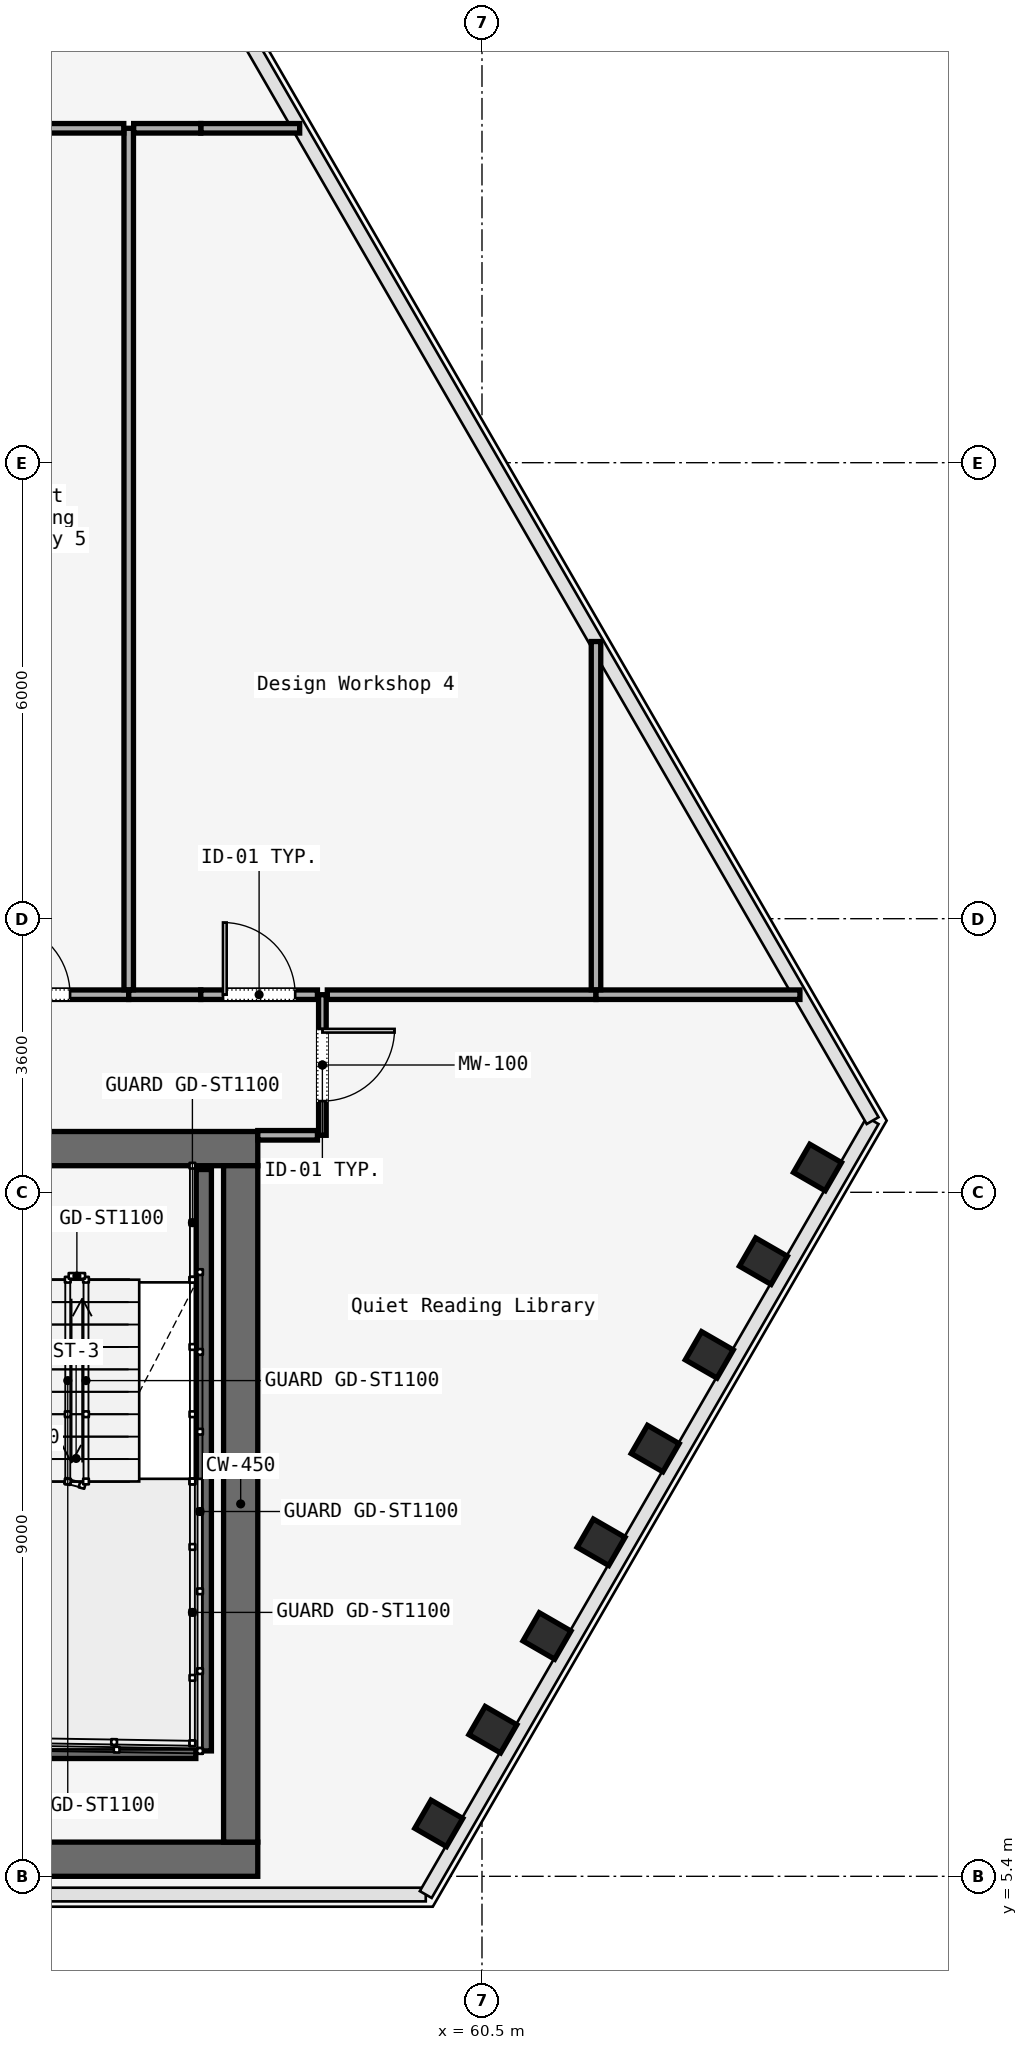
"""IFC4 building model, lengths in metres.
Left out: names, types, materials, properties, quantities, classifications, styles, units other than length and angle.
Written with IfcOpenShell. Run it as: python <this file> out.ifc"""

import sys

from ifc_helpers import new_model, si_unit, direction, frame, frame_2d, origin, origin_2d, place, context, subcontext, project, spatial, rectangle, i_section, extrude, element, fill, save


model = new_model("IFC4")
c1 = context("Model", 3, precision=1e-05, world=origin(), true_north=direction((0.0, 1.0)))
c2 = subcontext(c1, "Body", "Model", "MODEL_VIEW")
j1 = project(units=[si_unit("LENGTHUNIT", "METRE"), si_unit("PLANEANGLEUNIT", "RADIAN")], contexts=[c1])
p1 = place(None, origin())
s1 = spatial("IfcSite", under=j1, at=p1, CompositionType="ELEMENT")
p2 = place(p1, origin())
s2 = spatial("IfcBuilding", under=s1, at=p2, CompositionType="ELEMENT")
p3 = place(p2, frame((0.0, 0.0, 146.0)))
s3 = spatial("IfcBuildingStorey", under=s2, at=p3, CompositionType="ELEMENT", Elevation=146.0)
p4 = place(p3, frame((26.45, 14.975, 0.0), z_axis=(0.0, 0.0, 1.0), x_axis=(1.0, 0.0, 0.0)))
e1 = element("IfcWall", 1, at=p4, inside=s3, PredefinedType="SOLIDWALL", context=c2, shape_type="SweptSolid", body=[
    extrude(rectangle(XDim=31.1, YDim=0.45, at=frame_2d((15.55, 0.0))), origin(), (0.0, 0.0, 1.0), 3.58),
])
p5 = place(p4, frame((1.65, 0.0, 0.0)))
e2 = element("IfcOpeningElement", 2, at=p5, cuts=e1, PredefinedType="OPENING", context=c2, shape_type="SweptSolid", body=[
    extrude(rectangle(XDim=1.1, YDim=2.2, at=frame_2d((0.55, 1.1))), frame((0.0, 0.225, 0.0), z_axis=(0.0, -1.0, 0.0), x_axis=(1.0, 0.0, 0.0)), (0.0, 0.0, 1.0), 0.45),
])
p6 = place(p4, frame((13.65, 0.0, 0.0)))
e3 = element("IfcOpeningElement", 3, at=p6, cuts=e1, PredefinedType="OPENING", context=c2, shape_type="SweptSolid", body=[
    extrude(rectangle(XDim=1.1, YDim=2.2, at=frame_2d((0.55, 1.1))), frame((0.0, 0.225, 0.0), z_axis=(0.0, -1.0, 0.0), x_axis=(1.0, 0.0, 0.0)), (0.0, 0.0, 1.0), 0.45),
])
p7 = place(p4, frame((25.55, 0.0, 0.0)))
e4 = element("IfcOpeningElement", 4, at=p7, cuts=e1, PredefinedType="OPENING", context=c2, shape_type="SweptSolid", body=[
    extrude(rectangle(XDim=1.1, YDim=2.2, at=frame_2d((0.55, 1.1))), frame((0.0, 0.225, 0.0), z_axis=(0.0, -1.0, 0.0), x_axis=(1.0, 0.0, 0.0)), (0.0, 0.0, 1.0), 0.45),
])
p8 = place(p4, frame((10.7, 0.0, 0.0)))
e5 = element("IfcOpeningElement", 5, at=p8, cuts=e1, PredefinedType="OPENING", context=c2, shape_type="SweptSolid", body=[
    extrude(rectangle(XDim=1.4, YDim=2.2, at=frame_2d((0.7, 1.1))), frame((0.0, 0.225, 0.0), z_axis=(0.0, -1.0, 0.0), x_axis=(1.0, 0.0, 0.0)), (0.0, 0.0, 1.0), 0.45),
])
p9 = place(p4, frame((19.35, 0.0, 0.0)))
e6 = element("IfcOpeningElement", 6, at=p9, cuts=e1, PredefinedType="OPENING", context=c2, shape_type="SweptSolid", body=[
    extrude(rectangle(XDim=1.1, YDim=2.2, at=frame_2d((0.55, 1.1))), frame((0.0, 0.225, 0.0), z_axis=(0.0, -1.0, 0.0), x_axis=(1.0, 0.0, 0.0)), (0.0, 0.0, 1.0), 0.45),
])
p10 = place(p4, frame((21.4, 0.0, 0.0)))
e7 = element("IfcOpeningElement", 7, at=p10, cuts=e1, PredefinedType="OPENING", context=c2, shape_type="SweptSolid", body=[
    extrude(rectangle(XDim=0.9, YDim=2.1, at=frame_2d((0.45, 1.05))), frame((0.0, 0.225, 0.0), z_axis=(0.0, -1.0, 0.0), x_axis=(1.0, 0.0, 0.0)), (0.0, 0.0, 1.0), 0.45),
])
p11 = place(p4, frame((23.35, 0.0, 0.0)))
e8 = element("IfcOpeningElement", 8, at=p11, cuts=e1, PredefinedType="OPENING", context=c2, shape_type="SweptSolid", body=[
    extrude(rectangle(XDim=1.3, YDim=2.3, at=frame_2d((0.65, 1.15))), frame((0.0, 0.225, 0.0), z_axis=(0.0, -1.0, 0.0), x_axis=(1.0, 0.0, 0.0)), (0.0, 0.0, 1.0), 0.45),
])
p12 = place(p3, frame((26.45, 5.625, 0.0), z_axis=(0.0, 0.0, 1.0), x_axis=(1.0, 0.0, 0.0)))
e9 = element("IfcWall", 9, at=p12, inside=s3, PredefinedType="SOLIDWALL", context=c2, shape_type="SweptSolid", body=[
    extrude(rectangle(XDim=31.1, YDim=0.45, at=frame_2d((15.55, 0.0))), origin(), (0.0, 0.0, 1.0), 3.58),
])
p13 = place(p3, frame((57.325, 5.85, 0.0), z_axis=(0.0, 0.0, 1.0), x_axis=(0.0, 1.0, 0.0)))
e10 = element("IfcWall", 10, at=p13, inside=s3, PredefinedType="SOLIDWALL", context=c2, shape_type="SweptSolid", body=[
    extrude(rectangle(XDim=8.9, YDim=0.45, at=frame_2d((4.45, 0.0))), origin(), (0.0, 0.0, 1.0), 3.58),
])
p14 = place(p3, frame((59.931, 6.096, 0.0), z_axis=(0.082839870593, -0.008698526198, 0.996524907607), x_axis=(-0.806082141971, 0.587390840077, 0.072135853696)))
e11 = element("IfcColumn", 11, at=p14, inside=s3, PredefinedType="COLUMN", context=c2, shape_type="SweptSolid", body=[
    extrude(i_section(OverallWidth=0.428, OverallDepth=0.481, WebThickness=0.051, FlangeThickness=0.065, FilletRadius=0.015, at=origin_2d()), origin(), (0.0, 0.0, 1.0), 3.593),
])
p15 = place(p3, frame((60.643, 7.329, 0.0), z_axis=(0.0728174138, -0.025972224156, 0.99700705505), x_axis=(-0.645278448481, 0.76100790061, 0.066952962108)))
e12 = element("IfcColumn", 12, at=p15, inside=s3, PredefinedType="COLUMN", context=c2, shape_type="SweptSolid", body=[
    extrude(i_section(OverallWidth=0.428, OverallDepth=0.481, WebThickness=0.051, FlangeThickness=0.065, FilletRadius=0.015, at=origin_2d()), origin(), (0.0, 0.0, 1.0), 3.591),
])
p16 = place(p3, frame((61.355, 8.562, 0.0), z_axis=(0.06289544663, -0.043312864328, 0.99707981555), x_axis=(-0.427590176729, 0.901550198102, 0.0661353239)))
e13 = element("IfcColumn", 13, at=p16, inside=s3, PredefinedType="COLUMN", context=c2, shape_type="SweptSolid", body=[
    extrude(i_section(OverallWidth=0.428, OverallDepth=0.481, WebThickness=0.051, FlangeThickness=0.065, FilletRadius=0.015, at=origin_2d()), origin(), (0.0, 0.0, 1.0), 3.591),
])
p17 = place(p3, frame((62.067, 9.795, 0.0), z_axis=(0.05281532937, -0.06063227001, 0.996761891736), x_axis=(-0.189966625572, 0.979317815003, 0.069636903918)))
e14 = element("IfcColumn", 14, at=p17, inside=s3, PredefinedType="COLUMN", context=c2, shape_type="SweptSolid", body=[
    extrude(i_section(OverallWidth=0.428, OverallDepth=0.481, WebThickness=0.051, FlangeThickness=0.065, FilletRadius=0.015, at=origin_2d()), origin(), (0.0, 0.0, 1.0), 3.592),
])
p18 = place(p3, frame((62.779, 11.028, 0.0), z_axis=(0.042792297072, -0.077909150383, 0.996041657561), x_axis=(0.022973401155, 0.996768007381, 0.076978973114)))
e15 = element("IfcColumn", 15, at=p18, inside=s3, PredefinedType="COLUMN", context=c2, shape_type="SweptSolid", body=[
    extrude(i_section(OverallWidth=0.428, OverallDepth=0.481, WebThickness=0.051, FlangeThickness=0.065, FilletRadius=0.015, at=origin_2d()), origin(), (0.0, 0.0, 1.0), 3.594),
])
p19 = place(p3, frame((63.49, 12.261, 0.0), z_axis=(0.032770679105, -0.095123172061, 0.99492595942), x_axis=(0.192082129751, 0.977503301261, 0.087130657372)))
e16 = element("IfcColumn", 16, at=p19, inside=s3, PredefinedType="COLUMN", context=c2, shape_type="SweptSolid", body=[
    extrude(i_section(OverallWidth=0.428, OverallDepth=0.481, WebThickness=0.051, FlangeThickness=0.065, FilletRadius=0.015, at=origin_2d()), origin(), (0.0, 0.0, 1.0), 3.598),
])
p20 = place(p3, frame((64.202, 13.494, 0.0), z_axis=(0.022762459803, -0.112254154445, 0.993418781398), x_axis=(0.319053107814, 0.942531575503, 0.099193465383)))
e17 = element("IfcColumn", 17, at=p20, inside=s3, PredefinedType="COLUMN", context=c2, shape_type="SweptSolid", body=[
    extrude(i_section(OverallWidth=0.428, OverallDepth=0.481, WebThickness=0.051, FlangeThickness=0.065, FilletRadius=0.015, at=origin_2d()), origin(), (0.0, 0.0, 1.0), 3.604),
])
p21 = place(p3, frame((64.914, 14.727, 0.0), z_axis=(0.012779481275, -0.129282371416, 0.991525467802), x_axis=(0.413106039492, 0.903706514921, 0.112507488752)))
e18 = element("IfcColumn", 18, at=p21, inside=s3, PredefinedType="COLUMN", context=c2, shape_type="SweptSolid", body=[
    extrude(i_section(OverallWidth=0.428, OverallDepth=0.481, WebThickness=0.051, FlangeThickness=0.065, FilletRadius=0.015, at=origin_2d()), origin(), (0.0, 0.0, 1.0), 3.611),
])
p22 = place(p3, frame((56.84, 14.7, 0.0), z_axis=(0.0, 0.0, 1.0), x_axis=(0.0, -1.0, 0.0)))
e19 = element("IfcWall", 19, at=p22, inside=s3, PredefinedType="SOLIDWALL", context=c2, shape_type="SweptSolid", body=[
    extrude(rectangle(XDim=7.65, YDim=0.2, at=frame_2d((3.825, 0.0))), origin(), (0.0, 0.0, 1.0), 3.8),
])
p23 = place(p3, frame((53.62, 7.05, 0.0), z_axis=(0.0, 0.0, 1.0), x_axis=(1.0, 0.0, 0.0)))
e20 = element("IfcWall", 20, at=p23, inside=s3, PredefinedType="SOLIDWALL", context=c2, shape_type="SweptSolid", body=[
    extrude(rectangle(XDim=3.115, YDim=0.2, at=frame_2d((1.558, 0.0))), origin(), (0.0, 0.0, 1.0), 3.8),
])
p24 = place(p3, frame((58.4, 17.0, 0.0), z_axis=(0.0, 0.0, 1.0), x_axis=(0.0, -1.0, 0.0)))
e21 = element("IfcWall", 21, at=p24, inside=s3, PredefinedType="MOVABLE", context=c2, shape_type="SweptSolid", body=[
    extrude(rectangle(XDim=1.85, YDim=0.1, at=frame_2d((0.925, 0.0))), origin(), (0.0, 0.0, 1.0), 3.01),
])
p25 = place(p24, frame((0.45, 0.0, 0.0)))
e22 = element("IfcOpeningElement", 22, at=p25, cuts=e21, PredefinedType="OPENING", context=c2, shape_type="SweptSolid", body=[
    extrude(rectangle(XDim=0.95, YDim=2.2, at=frame_2d((0.475, 1.1))), frame((0.0, 0.05, 0.0), z_axis=(0.0, -1.0, 0.0), x_axis=(1.0, 0.0, 0.0)), (0.0, 0.0, 1.0), 0.1),
])
p26 = place(p3, frame((58.335, 15.15, 0.0), z_axis=(0.0, 0.0, 1.0), x_axis=(-1.0, 0.0, 0.0)))
e23 = element("IfcWall", 23, at=p26, inside=s3, PredefinedType="PARTITIONING", context=c2, shape_type="SweptSolid", body=[
    extrude(rectangle(XDim=0.785, YDim=0.125, at=frame_2d((0.393, 0.0))), origin(), (0.0, 0.0, 1.0), 3.01),
])
p27 = place(p3, frame((53.359, 17.0, 0.0), z_axis=(0.0, 0.0, 1.0), x_axis=(1.0, 0.0, 0.0)))
e24 = element("IfcWall", 24, at=p27, inside=s3, PredefinedType="PARTITIONING", context=c2, shape_type="SweptSolid", body=[
    extrude(rectangle(XDim=2.493, YDim=0.125, at=frame_2d((1.247, 0.0))), origin(), (0.0, 0.0, 1.0), 3.01),
])
p28 = place(p27, frame((0.771, 0.0, 0.0)))
e25 = element("IfcOpeningElement", 25, at=p28, cuts=e24, PredefinedType="OPENING", context=c2, shape_type="SweptSolid", body=[
    extrude(rectangle(XDim=0.95, YDim=2.2, at=frame_2d((0.475, 1.1))), frame((0.0, 0.062, 0.0), z_axis=(0.0, -1.0, 0.0), x_axis=(1.0, 0.0, 0.0)), (0.0, 0.0, 1.0), 0.125),
])
p29 = place(p3, frame((55.852, 17.0, 0.0), z_axis=(0.0, 0.0, 1.0), x_axis=(1.0, 0.0, 0.0)))
e26 = element("IfcWall", 26, at=p29, inside=s3, PredefinedType="PARTITIONING", context=c2, shape_type="SweptSolid", body=[
    extrude(rectangle(XDim=0.948, YDim=0.125, at=frame_2d((0.474, 0.0))), origin(), (0.0, 0.0, 1.0), 3.01),
])
p30 = place(p3, frame((56.8, 17.0, 0.0), z_axis=(0.0, 0.0, 1.0), x_axis=(1.0, 0.0, 0.0)))
e27 = element("IfcWall", 27, at=p30, inside=s3, PredefinedType="PARTITIONING", context=c2, shape_type="SweptSolid", body=[
    extrude(rectangle(XDim=1.535, YDim=0.125, at=frame_2d((0.768, 0.0))), origin(), (0.0, 0.0, 1.0), 3.01),
])
p31 = place(p30, frame((0.292, 0.0, 0.0)))
e28 = element("IfcOpeningElement", 28, at=p31, cuts=e27, PredefinedType="OPENING", context=c2, shape_type="SweptSolid", body=[
    extrude(rectangle(XDim=0.95, YDim=2.2, at=frame_2d((0.475, 1.1))), frame((0.0, 0.062, 0.0), z_axis=(0.0, -1.0, 0.0), x_axis=(1.0, 0.0, 0.0)), (0.0, 0.0, 1.0), 0.125),
])
p32 = place(p3, frame((58.465, 17.0, 0.0), z_axis=(0.0, 0.0, 1.0), x_axis=(1.0, 0.0, 0.0)))
e29 = element("IfcWall", 29, at=p32, inside=s3, PredefinedType="PARTITIONING", context=c2, shape_type="SweptSolid", body=[
    extrude(rectangle(XDim=3.535, YDim=0.125, at=frame_2d((1.768, 0.0))), origin(), (0.0, 0.0, 1.0), 3.01),
])
p33 = place(p3, frame((62.0, 17.0, 0.0), z_axis=(0.0, 0.0, 1.0), x_axis=(1.0, 0.0, 0.0)))
e30 = element("IfcWall", 30, at=p33, inside=s3, PredefinedType="PARTITIONING", context=c2, shape_type="SweptSolid", body=[
    extrude(rectangle(XDim=2.683, YDim=0.125, at=frame_2d((1.342, 0.0))), origin(), (0.0, 0.0, 1.0), 3.01),
])
p34 = place(p3, frame((56.8, 28.4, 0.0), z_axis=(0.0, 0.0, 1.0), x_axis=(1.0, 0.0, 0.0)))
e31 = element("IfcWall", 31, at=p34, inside=s3, PredefinedType="PARTITIONING", context=c2, shape_type="SweptSolid", body=[
    extrude(rectangle(XDim=1.301, YDim=0.125, at=frame_2d((0.651, 0.0))), origin(), (0.0, 0.0, 1.0), 3.01),
])
p35 = place(p3, frame((62.0, 21.647, 0.0), z_axis=(0.0, 0.0, 1.0), x_axis=(0.0, -1.0, 0.0)))
e32 = element("IfcWall", 32, at=p35, inside=s3, PredefinedType="PARTITIONING", context=c2, shape_type="SweptSolid", body=[
    extrude(rectangle(XDim=4.582, YDim=0.125, at=frame_2d((2.291, 0.0))), origin(), (0.0, 0.0, 1.0), 3.01),
])
p36 = place(p3, frame((55.852, 17.065, 0.0), z_axis=(0.0, 0.0, 1.0), x_axis=(0.0, 1.0, 0.0)))
e33 = element("IfcWall", 33, at=p36, inside=s3, PredefinedType="PARTITIONING", context=c2, shape_type="SweptSolid", body=[
    extrude(rectangle(XDim=11.335, YDim=0.125, at=frame_2d((5.667, 0.0))), origin(), (0.0, 0.0, 1.0), 3.01),
])
p37 = place(p3, frame((55.917, 28.4, 0.0), z_axis=(0.0, 0.0, 1.0), x_axis=(1.0, 0.0, 0.0)))
e34 = element("IfcWall", 34, at=p37, inside=s3, PredefinedType="PARTITIONING", context=c2, shape_type="SweptSolid", body=[
    extrude(rectangle(XDim=0.883, YDim=0.125, at=frame_2d((0.441, 0.0))), origin(), (0.0, 0.0, 1.0), 3.01),
])
p38 = place(p3, frame((53.424, 28.4, 0.0), z_axis=(0.0, 0.0, 1.0), x_axis=(1.0, 0.0, 0.0)))
e35 = element("IfcWall", 35, at=p38, inside=s3, PredefinedType="PARTITIONING", context=c2, shape_type="SweptSolid", body=[
    extrude(rectangle(XDim=2.363, YDim=0.125, at=frame_2d((1.182, 0.0))), origin(), (0.0, 0.0, 1.0), 3.01),
])
p39 = place(p25, origin())
e36 = element("IfcDoor", 36, at=p39, inside=s3, OperationType="SINGLE_SWING_RIGHT", PredefinedType="DOOR", context=c2, shape_type="SweptSolid", body=[
    extrude(rectangle(XDim=0.95, YDim=2.2, at=frame_2d((0.475, 1.1))), frame((0.0, 0.025, 0.0), z_axis=(0.0, -1.0, 0.0), x_axis=(1.0, 0.0, 0.0)), (0.0, 0.0, 1.0), 0.05),
])
fill(e22, e36)
p40 = place(p31, origin())
e37 = element("IfcDoor", 37, at=p40, inside=s3, OperationType="SINGLE_SWING_RIGHT", PredefinedType="DOOR", context=c2, shape_type="SweptSolid", body=[
    extrude(rectangle(XDim=0.95, YDim=2.2, at=frame_2d((0.475, 1.1))), frame((0.0, 0.025, 0.0), z_axis=(0.0, -1.0, 0.0), x_axis=(1.0, 0.0, 0.0)), (0.0, 0.0, 1.0), 0.05),
])
fill(e28, e37)
p41 = place(p28, origin())
e38 = element("IfcDoor", 38, at=p41, inside=s3, OperationType="SINGLE_SWING_RIGHT", PredefinedType="DOOR", context=c2, shape_type="SweptSolid", body=[
    extrude(rectangle(XDim=0.95, YDim=2.2, at=frame_2d((0.475, 1.1))), frame((0.0, 0.025, 0.0), z_axis=(0.0, -1.0, 0.0), x_axis=(1.0, 0.0, 0.0)), (0.0, 0.0, 1.0), 0.05),
])
fill(e25, e38)
save(model, sys.argv[1])
